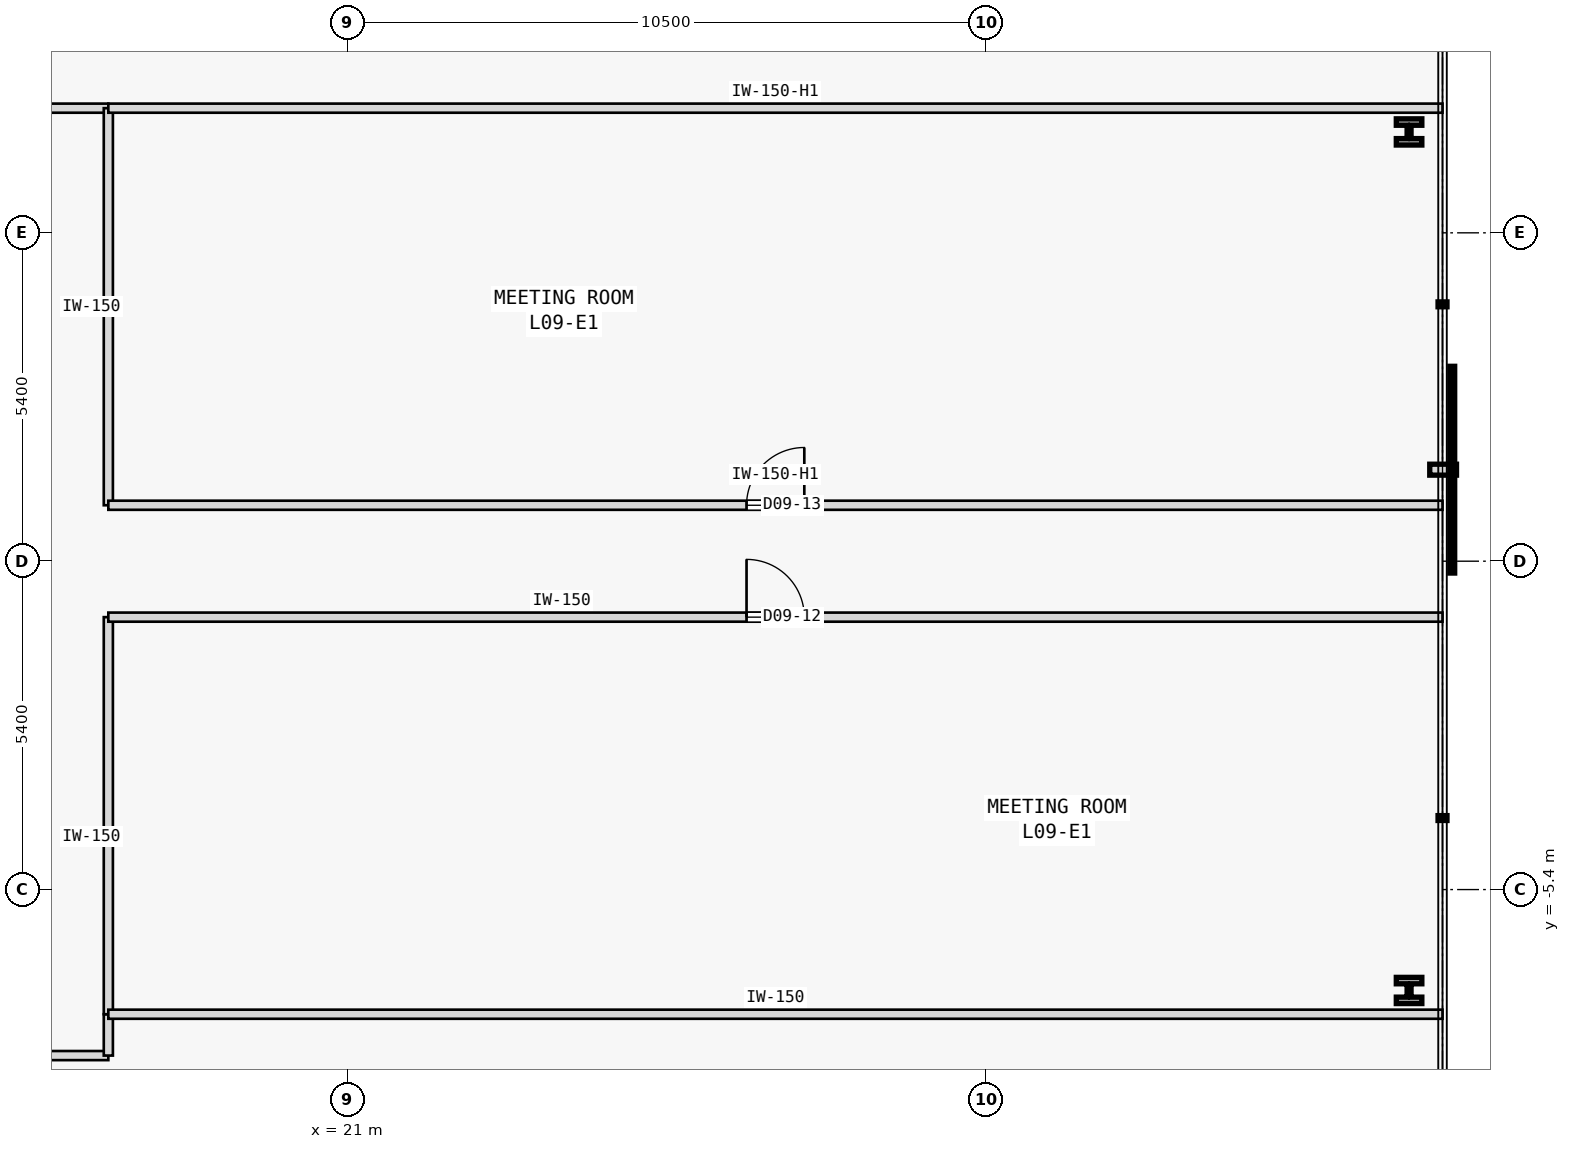
"""IFC4 building model, lengths in metres.
Left out: names, types, materials, properties, quantities, classifications, styles, units other than length and angle.
Written with IfcOpenShell. Run it as: python <this file> out.ifc"""

import sys

from ifc_helpers import new_model, si_unit, direction, frame, frame_2d, origin, origin_2d, place, context, subcontext, project, spatial, rectangle, i_section, extrude, element, fill, save


model = new_model("IFC4")
c1 = context("Model", 3, precision=1e-05, world=origin(), true_north=direction((0.0, 1.0)))
c2 = subcontext(c1, "Body", "Model", "MODEL_VIEW")
j1 = project(units=[si_unit("LENGTHUNIT", "METRE"), si_unit("PLANEANGLEUNIT", "RADIAN")], contexts=[c1])
p1 = place(None, origin())
s1 = spatial("IfcSite", under=j1, at=p1, CompositionType="ELEMENT")
p2 = place(p1, origin())
s2 = spatial("IfcBuilding", under=s1, at=p2, CompositionType="ELEMENT")
p3 = place(p2, frame((0.0, 0.0, 40.8)))
s3 = spatial("IfcBuildingStorey", under=s2, at=p3, CompositionType="ELEMENT", Elevation=40.8)
for number, where, z_axis, x_axis in (
    (1, (38.45, -7.059, 0.0), (0.0, 0.0, 1.0), (1.0, 0.0, 0.0)),
    (2, (38.45, 7.059, 0.0), (0.0, 0.0, 1.0), (1.0, 0.0, 0.0)),
):
    element("IfcColumn", number, at=place(p3, frame(where, z_axis=z_axis, x_axis=x_axis)), inside=s3, PredefinedType="COLUMN", context=c2, shape_type="SweptSolid", body=[
        extrude(i_section(OverallWidth=0.42, OverallDepth=0.431, WebThickness=0.065, FlangeThickness=0.106, FilletRadius=0.015, at=origin_2d()), origin(), (0.0, 0.0, 1.0), 3.8),
    ])
for number, where, z_axis, x_axis in (
    (3, (0.92, 7.45, 0.0), (0.0, 0.0, 1.0), (1.0, 0.0, 0.0)),
    (4, (0.92, -8.13, 0.0), (0.0, 0.0, 1.0), (1.0, 0.0, 0.0)),
):
    element("IfcWall", number, at=place(p3, frame(where, z_axis=z_axis, x_axis=x_axis)), inside=s3, PredefinedType="PARTITIONING", context=c2, shape_type="SweptSolid", body=[
        extrude(rectangle(XDim=16.139, YDim=0.15, at=frame_2d((8.07, 0.0))), origin(), (0.0, 0.0, 1.0), 3.575),
    ])
p4 = place(p3, frame((17.059, -8.13, 0.0), z_axis=(0.0, 0.0, 1.0), x_axis=(0.0, 1.0, 0.0)))
e5 = element("IfcWall", 5, at=p4, inside=s3, PredefinedType="PARTITIONING", context=c2, shape_type="SweptSolid", body=[
    extrude(rectangle(XDim=0.68, YDim=0.15, at=frame_2d((0.34, 0.0))), origin(), (0.0, 0.0, 1.0), 3.575),
])
p5 = place(p3, frame((17.059, -7.45, 0.0), z_axis=(0.0, 0.0, 1.0), x_axis=(0.0, 1.0, 0.0)))
e6 = element("IfcWall", 6, at=p5, inside=s3, PredefinedType="PARTITIONING", context=c2, shape_type="SweptSolid", body=[
    extrude(rectangle(XDim=6.53, YDim=0.15, at=frame_2d((3.265, 0.0))), origin(), (0.0, 0.0, 1.0), 3.575),
])
p6 = place(p3, frame((17.059, -0.92, 0.0), z_axis=(0.0, 0.0, 1.0), x_axis=(1.0, 0.0, 0.0)))
e7 = element("IfcWall", 7, at=p6, inside=s3, PredefinedType="PARTITIONING", context=c2, shape_type="SweptSolid", body=[
    extrude(rectangle(XDim=21.941, YDim=0.15, at=frame_2d((10.97, 0.0))), origin(), (0.0, 0.0, 1.0), 3.575),
])
p7 = place(p6, frame((10.496, 0.0, 0.0)))
e8 = element("IfcOpeningElement", 8, at=p7, cuts=e7, PredefinedType="OPENING", context=c2, shape_type="SweptSolid", body=[
    extrude(rectangle(XDim=0.95, YDim=2.15, at=frame_2d((0.475, 1.075))), frame((0.0, 0.085, 0.0), z_axis=(0.0, -1.0, 0.0), x_axis=(1.0, 0.0, 0.0)), (0.0, 0.0, 1.0), 0.17),
])
p8 = place(p3, frame((17.059, 0.92, 0.0), z_axis=(0.0, 0.0, 1.0), x_axis=(0.0, 1.0, 0.0)))
e9 = element("IfcWall", 9, at=p8, inside=s3, PredefinedType="PARTITIONING", context=c2, shape_type="SweptSolid", body=[
    extrude(rectangle(XDim=6.53, YDim=0.15, at=frame_2d((3.265, 0.0))), origin(), (0.0, 0.0, 1.0), 3.575),
])
p9 = place(p3, frame((17.059, 0.92, 0.0), z_axis=(0.0, 0.0, 1.0), x_axis=(1.0, 0.0, 0.0)))
e10 = element("IfcWall", 10, at=p9, inside=s3, PredefinedType="PARTITIONING", context=c2, shape_type="SweptSolid", body=[
    extrude(rectangle(XDim=21.941, YDim=0.15, at=frame_2d((10.97, 0.0))), origin(), (0.0, 0.0, 1.0), 3.125),
])
p10 = place(p9, frame((10.496, 0.0, 0.0)))
e11 = element("IfcOpeningElement", 11, at=p10, cuts=e10, PredefinedType="OPENING", context=c2, shape_type="SweptSolid", body=[
    extrude(rectangle(XDim=0.95, YDim=2.15, at=frame_2d((0.475, 1.075))), frame((0.0, 0.085, 0.0), z_axis=(0.0, -1.0, 0.0), x_axis=(1.0, 0.0, 0.0)), (0.0, 0.0, 1.0), 0.17),
])
p11 = place(p3, frame((17.059, 7.45, 0.0), z_axis=(0.0, 0.0, 1.0), x_axis=(1.0, 0.0, 0.0)))
e12 = element("IfcWall", 12, at=p11, inside=s3, PredefinedType="PARTITIONING", context=c2, shape_type="SweptSolid", body=[
    extrude(rectangle(XDim=21.941, YDim=0.15, at=frame_2d((10.97, 0.0))), origin(), (0.0, 0.0, 1.0), 3.125),
])
p12 = place(p3, frame((17.059, -7.45, 0.0), z_axis=(0.0, 0.0, 1.0), x_axis=(1.0, 0.0, 0.0)))
e13 = element("IfcWall", 13, at=p12, inside=s3, PredefinedType="PARTITIONING", context=c2, shape_type="SweptSolid", body=[
    extrude(rectangle(XDim=21.941, YDim=0.15, at=frame_2d((10.97, 0.0))), origin(), (0.0, 0.0, 1.0), 3.575),
])
p13 = place(p7, origin())
e14 = element("IfcDoor", 14, at=p13, inside=s3, OperationType="SINGLE_SWING_LEFT", PredefinedType="DOOR", context=c2, shape_type="SweptSolid", body=[
    extrude(rectangle(XDim=0.95, YDim=2.15, at=frame_2d((0.475, 1.075))), frame((0.0, 0.025, 0.0), z_axis=(0.0, -1.0, 0.0), x_axis=(1.0, 0.0, 0.0)), (0.0, 0.0, 1.0), 0.05),
])
fill(e8, e14)
p14 = place(p10, origin())
e15 = element("IfcDoor", 15, at=p14, inside=s3, OperationType="SINGLE_SWING_RIGHT", PredefinedType="DOOR", context=c2, shape_type="SweptSolid", body=[
    extrude(rectangle(XDim=0.95, YDim=2.15, at=frame_2d((0.475, 1.075))), frame((0.0, 0.025, 0.0), z_axis=(0.0, -1.0, 0.0), x_axis=(1.0, 0.0, 0.0)), (0.0, 0.0, 1.0), 0.05),
])
fill(e11, e15)
save(model, sys.argv[1])
